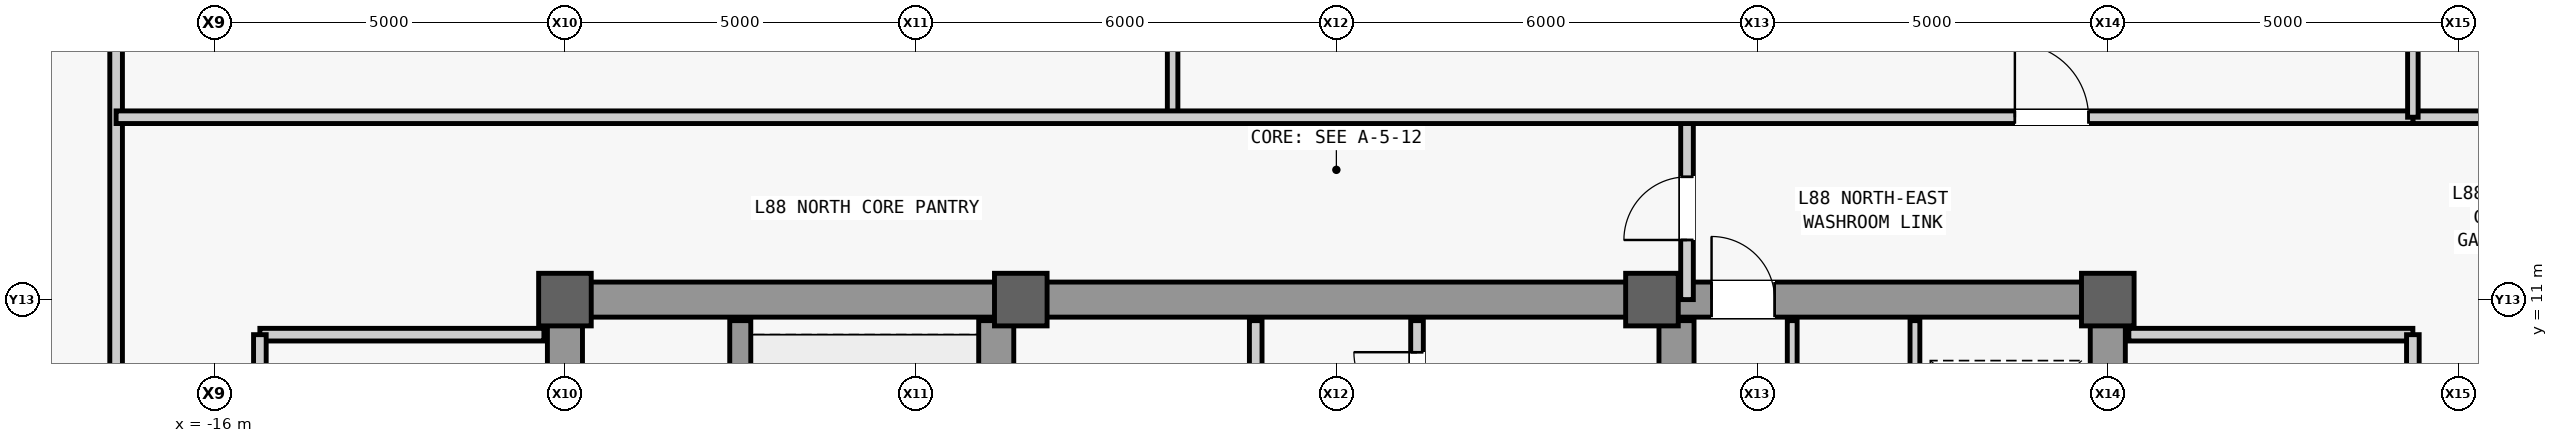
"""IFC4 building model, lengths in metres.
Left out: names, types, materials, properties, quantities, classifications, styles, units other than length and angle.
Written with IfcOpenShell. Run it as: python <this file> out.ifc"""

import sys

from ifc_helpers import new_model, si_unit, direction, frame, frame_2d, origin, origin_2d, place, context, subcontext, project, spatial, rectangle, extrude, source, transform, mapped, element, fill, save


model = new_model("IFC4")
c1 = context("Model", 3, precision=1e-05, world=origin(), true_north=direction((0.0, 1.0)))
c2 = subcontext(c1, "Body", "Model", "MODEL_VIEW")
j1 = project(units=[si_unit("LENGTHUNIT", "METRE"), si_unit("PLANEANGLEUNIT", "RADIAN")], contexts=[c1])
p1 = place(None, origin())
s1 = spatial("IfcSite", under=j1, at=p1, CompositionType="ELEMENT")
p2 = place(p1, origin())
s2 = spatial("IfcBuilding", under=s1, at=p2, CompositionType="ELEMENT")
p3 = place(p2, frame((0.0, 0.0, 370.3)))
s3 = spatial("IfcBuildingStorey", under=s2, at=p3, CompositionType="ELEMENT", Elevation=370.3)
m1 = source(origin(), c2, "Body", "SweptSolid", [
    extrude(rectangle(XDim=22.0, YDim=0.5, at=frame_2d((11.0, 0.0))), origin(), (0.0, 0.0, 1.0), 4.6),
])
p4 = place(p3, frame((-11.0, -11.0, 0.0), z_axis=(0.0, 0.0, 1.0), x_axis=(0.0, 1.0, 0.0)))
e1 = element("IfcWall", 1, at=p4, inside=s3, PredefinedType="SHEAR", context=c2, shape_type="MappedRepresentation", body=[
    mapped(m1, transform((0.0, 0.0, 0.0), scale=1.0)),
])
m2 = source(origin(), c2, "Body", "SweptSolid", [
    extrude(rectangle(XDim=1.1, YDim=2.2, at=frame_2d((0.55, 1.1))), frame((0.0, 0.26, 0.0), z_axis=(0.0, -1.0, 0.0), x_axis=(1.0, 0.0, 0.0)), (0.0, 0.0, 1.0), 0.52),
])
p5 = place(p4, frame((0.8, 0.0, 0.0)))
e2 = element("IfcOpeningElement", 2, at=p5, cuts=e1, PredefinedType="OPENING", context=c2, shape_type="MappedRepresentation", body=[
    mapped(m2, transform((0.0, 0.0, 0.0), scale=1.0)),
])
p6 = place(p4, frame((12.5, 0.0, 0.0)))
e3 = element("IfcOpeningElement", 3, at=p6, cuts=e1, PredefinedType="OPENING", context=c2, shape_type="MappedRepresentation", body=[
    mapped(m2, transform((0.0, 0.0, 0.0), scale=1.0)),
])
m3 = source(origin(), c2, "Body", "SweptSolid", [
    extrude(rectangle(XDim=0.9, YDim=2.15, at=frame_2d((0.45, 1.075))), frame((0.0, 0.26, 0.0), z_axis=(0.0, -1.0, 0.0), x_axis=(1.0, 0.0, 0.0)), (0.0, 0.0, 1.0), 0.52),
])
p7 = place(p4, frame((7.575, 0.0, 0.0)))
e4 = element("IfcOpeningElement", 4, at=p7, cuts=e1, PredefinedType="OPENING", context=c2, shape_type="MappedRepresentation", body=[
    mapped(m3, transform((0.0, 0.0, 0.0), scale=1.0)),
])
m4 = source(origin(), c2, "Body", "SweptSolid", [
    extrude(rectangle(XDim=1.2, YDim=2.3, at=frame_2d((0.6, 1.15))), frame((0.0, 0.26, 0.0), z_axis=(0.0, -1.0, 0.0), x_axis=(1.0, 0.0, 0.0)), (0.0, 0.0, 1.0), 0.52),
])
p8 = place(p4, frame((14.6, 0.0, 0.0)))
e5 = element("IfcOpeningElement", 5, at=p8, cuts=e1, PredefinedType="OPENING", context=c2, shape_type="MappedRepresentation", body=[
    mapped(m4, transform((0.0, 0.0, 0.0), scale=1.0)),
])
p9 = place(p4, frame((18.2, 0.0, 0.0)))
e6 = element("IfcOpeningElement", 6, at=p9, cuts=e1, PredefinedType="OPENING", context=c2, shape_type="MappedRepresentation", body=[
    mapped(m4, transform((0.0, 0.0, 0.0), scale=1.0)),
])
m5 = source(origin(), c2, "Body", "SweptSolid", [
    extrude(rectangle(XDim=1.3, YDim=2.3, at=frame_2d((0.65, 1.15))), frame((0.0, 0.26, 0.0), z_axis=(0.0, -1.0, 0.0), x_axis=(1.0, 0.0, 0.0)), (0.0, 0.0, 1.0), 0.52),
])
p10 = place(p4, frame((2.7, 0.0, 0.0)))
e7 = element("IfcOpeningElement", 7, at=p10, cuts=e1, PredefinedType="OPENING", context=c2, shape_type="MappedRepresentation", body=[
    mapped(m5, transform((0.0, 0.0, 0.0), scale=1.0)),
])
p11 = place(p3, frame((11.0, -11.0, 0.0), z_axis=(0.0, 0.0, 1.0), x_axis=(0.0, 1.0, 0.0)))
e8 = element("IfcWall", 8, at=p11, inside=s3, PredefinedType="SHEAR", context=c2, shape_type="MappedRepresentation", body=[
    mapped(m1, transform((0.0, 0.0, 0.0), scale=1.0)),
])
p12 = place(p11, frame((0.8, 0.0, 0.0)))
e9 = element("IfcOpeningElement", 9, at=p12, cuts=e8, PredefinedType="OPENING", context=c2, shape_type="MappedRepresentation", body=[
    mapped(m2, transform((0.0, 0.0, 0.0), scale=1.0)),
])
p13 = place(p11, frame((7.575, 0.0, 0.0)))
e10 = element("IfcOpeningElement", 10, at=p13, cuts=e8, PredefinedType="OPENING", context=c2, shape_type="MappedRepresentation", body=[
    mapped(m3, transform((0.0, 0.0, 0.0), scale=1.0)),
])
p14 = place(p11, frame((17.6, 0.0, 0.0)))
e11 = element("IfcOpeningElement", 11, at=p14, cuts=e8, PredefinedType="OPENING", context=c2, shape_type="MappedRepresentation", body=[
    mapped(m4, transform((0.0, 0.0, 0.0), scale=1.0)),
])
p15 = place(p11, frame((19.6, 0.0, 0.0)))
e12 = element("IfcOpeningElement", 12, at=p15, cuts=e8, PredefinedType="OPENING", context=c2, shape_type="MappedRepresentation", body=[
    mapped(m4, transform((0.0, 0.0, 0.0), scale=1.0)),
])
p16 = place(p11, frame((2.7, 0.0, 0.0)))
e13 = element("IfcOpeningElement", 13, at=p16, cuts=e8, PredefinedType="OPENING", context=c2, shape_type="MappedRepresentation", body=[
    mapped(m5, transform((0.0, 0.0, 0.0), scale=1.0)),
])
p17 = place(p11, frame((13.35, 0.0, 0.0)))
e14 = element("IfcOpeningElement", 14, at=p17, cuts=e8, PredefinedType="OPENING", context=c2, shape_type="MappedRepresentation", body=[
    mapped(m5, transform((0.0, 0.0, 0.0), scale=1.0)),
])
m6 = source(origin(), c2, "Body", "SweptSolid", [
    extrude(rectangle(XDim=21.4, YDim=0.5, at=frame_2d((10.7, 0.0))), origin(), (0.0, 0.0, 1.0), 4.6),
])
for number, where, z_axis, x_axis in (
    (15, (-4.85, -10.7, 0.0), (0.0, 0.0, 1.0), (0.0, 1.0, 0.0)),
    (16, (4.85, -10.7, 0.0), (0.0, 0.0, 1.0), (0.0, 1.0, 0.0)),
):
    element("IfcWall", number, at=place(p3, frame(where, z_axis=z_axis, x_axis=x_axis)), inside=s3, PredefinedType="SHEAR", context=c2, shape_type="MappedRepresentation", body=[
        mapped(m6, transform((0.0, 0.0, 0.0), scale=1.0)),
    ])
m7 = source(origin(), c2, "Body", "SweptSolid", [
    extrude(rectangle(XDim=5.9, YDim=0.5, at=frame_2d((2.95, 0.0))), origin(), (0.0, 0.0, 1.0), 4.6),
])
p18 = place(p3, frame((-10.75, 11.0, 0.0), z_axis=(0.0, 0.0, 1.0), x_axis=(1.0, 0.0, 0.0)))
e17 = element("IfcWall", 17, at=p18, inside=s3, PredefinedType="SHEAR", context=c2, shape_type="MappedRepresentation", body=[
    mapped(m7, transform((0.0, 0.0, 0.0), scale=1.0)),
])
p19 = place(p3, frame((4.85, 11.0, 0.0), z_axis=(0.0, 0.0, 1.0), x_axis=(1.0, 0.0, 0.0)))
e18 = element("IfcWall", 18, at=p19, inside=s3, PredefinedType="SHEAR", context=c2, shape_type="MappedRepresentation", body=[
    mapped(m7, transform((0.0, 0.0, 0.0), scale=1.0)),
])
p20 = place(p19, frame((0.5, 0.0, 0.0)))
e19 = element("IfcOpeningElement", 19, at=p20, cuts=e18, PredefinedType="OPENING", context=c2, shape_type="MappedRepresentation", body=[
    mapped(m3, transform((0.0, 0.0, 0.0), scale=1.0)),
])
m8 = source(origin(), c2, "Body", "SweptSolid", [
    extrude(rectangle(XDim=9.2, YDim=0.5, at=frame_2d((4.6, 0.0))), origin(), (0.0, 0.0, 1.0), 4.6),
])
p21 = place(p3, frame((-4.6, 11.0, 0.0), z_axis=(0.0, 0.0, 1.0), x_axis=(1.0, 0.0, 0.0)))
e20 = element("IfcWall", 20, at=p21, inside=s3, PredefinedType="SHEAR", context=c2, shape_type="MappedRepresentation", body=[
    mapped(m8, transform((0.0, 0.0, 0.0), scale=1.0)),
])
m9 = source(origin(), c2, "Body", "SweptSolid", [
    extrude(rectangle(XDim=0.75, YDim=0.75, at=origin_2d()), origin(), (0.0, 0.0, 1.0), 5.2),
])
for number, where, z_axis, x_axis in (
    (21, (-11.0, 11.0, 0.0), (0.0, 0.0, 1.0), (1.0, 0.0, 0.0)),
    (22, (-4.5, 11.0, 0.0), (0.0, 0.0, 1.0), (1.0, 0.0, 0.0)),
    (23, (4.5, 11.0, 0.0), (0.0, 0.0, 1.0), (1.0, 0.0, 0.0)),
    (24, (11.0, 11.0, 0.0), (0.0, 0.0, 1.0), (1.0, 0.0, 0.0)),
):
    element("IfcColumn", number, at=place(p3, frame(where, z_axis=z_axis, x_axis=x_axis)), inside=s3, PredefinedType="COLUMN", context=c2, shape_type="MappedRepresentation", body=[
        mapped(m9, transform((0.0, 0.0, 0.0), scale=1.0)),
    ])
m10 = source(origin(), c2, "Body", "SweptSolid", [
    extrude(rectangle(XDim=7.75, YDim=0.3, at=frame_2d((3.875, 0.0))), origin(), (0.0, 0.0, 1.0), 4.6),
])
p22 = place(p3, frame((-8.5, 2.95, 0.0), z_axis=(0.0, 0.0, 1.0), x_axis=(0.0, 1.0, 0.0)))
e25 = element("IfcWall", 25, at=p22, inside=s3, PredefinedType="SHEAR", context=c2, shape_type="MappedRepresentation", body=[
    mapped(m10, transform((0.0, 0.0, 0.0), scale=1.0)),
])
m11 = source(origin(), c2, "Body", "SweptSolid", [
    extrude(rectangle(XDim=9.4, YDim=0.14, at=frame_2d((4.7, 0.0))), origin(), (0.0, 0.0, 1.0), 4.6),
])
p23 = place(p3, frame((8.25, 1.3, 0.0), z_axis=(0.0, 0.0, 1.0), x_axis=(0.0, 1.0, 0.0)))
e26 = element("IfcWall", 26, at=p23, inside=s3, PredefinedType="PARTITIONING", context=c2, shape_type="MappedRepresentation", body=[
    mapped(m11, transform((0.0, 0.0, 0.0), scale=1.0)),
])
m12 = source(origin(), c2, "Body", "SweptSolid", [
    extrude(rectangle(XDim=5.7, YDim=0.14, at=frame_2d((2.85, 0.0))), origin(), (0.0, 0.0, 1.0), 4.6),
])
p24 = place(p3, frame((6.5, 5.0, 0.0), z_axis=(0.0, 0.0, 1.0), x_axis=(0.0, 1.0, 0.0)))
e27 = element("IfcWall", 27, at=p24, inside=s3, PredefinedType="PARTITIONING", context=c2, shape_type="MappedRepresentation", body=[
    mapped(m12, transform((0.0, 0.0, 0.0), scale=1.0)),
])
m13 = source(origin(), c2, "Body", "SweptSolid", [
    extrude(rectangle(XDim=0.9, YDim=2.15, at=frame_2d((0.45, 1.075))), frame((0.0, 0.08, 0.0), z_axis=(0.0, -1.0, 0.0), x_axis=(1.0, 0.0, 0.0)), (0.0, 0.0, 1.0), 0.16),
])
p25 = place(p24, frame((2.05, 0.0, 0.0)))
e28 = element("IfcOpeningElement", 28, at=p25, cuts=e27, PredefinedType="OPENING", context=c2, shape_type="MappedRepresentation", body=[
    mapped(m13, transform((0.0, 0.0, 0.0), scale=1.0)),
])
m14 = source(origin(), c2, "Body", "SweptSolid", [
    extrude(rectangle(XDim=4.05, YDim=0.18, at=frame_2d((2.025, 0.0))), origin(), (0.0, 0.0, 1.0), 4.6),
])
p26 = place(p3, frame((-15.35, 10.5, 0.0), z_axis=(0.0, 0.0, 1.0), x_axis=(1.0, 0.0, 0.0)))
e29 = element("IfcWall", 29, at=p26, inside=s3, PredefinedType="PARTITIONING", context=c2, shape_type="MappedRepresentation", body=[
    mapped(m14, transform((0.0, 0.0, 0.0), scale=1.0)),
])
m15 = source(origin(), c2, "Body", "SweptSolid", [
    extrude(rectangle(XDim=16.6, YDim=0.18, at=frame_2d((8.3, 0.0))), origin(), (0.0, 0.0, 1.0), 4.6),
])
p27 = place(p3, frame((-15.35, -6.1, 0.0), z_axis=(0.0, 0.0, 1.0), x_axis=(0.0, 1.0, 0.0)))
e30 = element("IfcWall", 30, at=p27, inside=s3, PredefinedType="PARTITIONING", context=c2, shape_type="MappedRepresentation", body=[
    mapped(m15, transform((0.0, 0.0, 0.0), scale=1.0)),
])
m16 = source(origin(), c2, "Body", "SweptSolid", [
    extrude(rectangle(XDim=1.8, YDim=2.25, at=frame_2d((0.9, 1.125))), frame((0.0, 0.1, 0.0), z_axis=(0.0, -1.0, 0.0), x_axis=(1.0, 0.0, 0.0)), (0.0, 0.0, 1.0), 0.2),
])
p28 = place(p27, frame((2.7, 0.0, 0.0)))
e31 = element("IfcOpeningElement", 31, at=p28, cuts=e30, PredefinedType="OPENING", context=c2, shape_type="MappedRepresentation", body=[
    mapped(m16, transform((0.0, 0.0, 0.0), scale=1.0)),
])
p29 = place(p27, frame((11.0, 0.0, 0.0)))
e32 = element("IfcOpeningElement", 32, at=p29, cuts=e30, PredefinedType="OPENING", context=c2, shape_type="MappedRepresentation", body=[
    mapped(m16, transform((0.0, 0.0, 0.0), scale=1.0)),
])
p30 = place(p3, frame((11.3, 10.5, 0.0), z_axis=(0.0, 0.0, 1.0), x_axis=(1.0, 0.0, 0.0)))
e33 = element("IfcWall", 33, at=p30, inside=s3, PredefinedType="PARTITIONING", context=c2, shape_type="MappedRepresentation", body=[
    mapped(m14, transform((0.0, 0.0, 0.0), scale=1.0)),
])
p31 = place(p3, frame((15.35, -6.1, 0.0), z_axis=(0.0, 0.0, 1.0), x_axis=(0.0, 1.0, 0.0)))
e34 = element("IfcWall", 34, at=p31, inside=s3, PredefinedType="PARTITIONING", context=c2, shape_type="MappedRepresentation", body=[
    mapped(m15, transform((0.0, 0.0, 0.0), scale=1.0)),
])
p32 = place(p31, frame((2.7, 0.0, 0.0)))
e35 = element("IfcOpeningElement", 35, at=p32, cuts=e34, PredefinedType="OPENING", context=c2, shape_type="MappedRepresentation", body=[
    mapped(m16, transform((0.0, 0.0, 0.0), scale=1.0)),
])
p33 = place(p31, frame((13.0, 0.0, 0.0)))
e36 = element("IfcOpeningElement", 36, at=p33, cuts=e34, PredefinedType="OPENING", context=c2, shape_type="MappedRepresentation", body=[
    mapped(m16, transform((0.0, 0.0, 0.0), scale=1.0)),
])
m17 = source(origin(), c2, "Body", "SweptSolid", [
    extrude(rectangle(XDim=5.4, YDim=0.18, at=frame_2d((2.7, 0.0))), origin(), (0.0, 0.0, 1.0), 4.6),
])
p34 = place(p3, frame((-1.15, 5.3, 0.0), z_axis=(0.0, 0.0, 1.0), x_axis=(0.0, 1.0, 0.0)))
e37 = element("IfcWall", 37, at=p34, inside=s3, PredefinedType="PARTITIONING", context=c2, shape_type="MappedRepresentation", body=[
    mapped(m17, transform((0.0, 0.0, 0.0), scale=1.0)),
])
m18 = source(origin(), c2, "Body", "SweptSolid", [
    extrude(rectangle(XDim=0.9, YDim=2.15, at=frame_2d((0.45, 1.075))), frame((0.0, 0.1, 0.0), z_axis=(0.0, -1.0, 0.0), x_axis=(1.0, 0.0, 0.0)), (0.0, 0.0, 1.0), 0.2),
])
p35 = place(p34, frame((0.7, 0.0, 0.0)))
e38 = element("IfcOpeningElement", 38, at=p35, cuts=e37, PredefinedType="OPENING", context=c2, shape_type="MappedRepresentation", body=[
    mapped(m18, transform((0.0, 0.0, 0.0), scale=1.0)),
])
p36 = place(p34, frame((3.4, 0.0, 0.0)))
e39 = element("IfcOpeningElement", 39, at=p36, cuts=e37, PredefinedType="OPENING", context=c2, shape_type="MappedRepresentation", body=[
    mapped(m18, transform((0.0, 0.0, 0.0), scale=1.0)),
])
p37 = place(p3, frame((1.15, 5.3, 0.0), z_axis=(0.0, 0.0, 1.0), x_axis=(0.0, 1.0, 0.0)))
e40 = element("IfcWall", 40, at=p37, inside=s3, PredefinedType="PARTITIONING", context=c2, shape_type="MappedRepresentation", body=[
    mapped(m17, transform((0.0, 0.0, 0.0), scale=1.0)),
])
p38 = place(p37, frame((0.45, 0.0, 0.0)))
e41 = element("IfcOpeningElement", 41, at=p38, cuts=e40, PredefinedType="OPENING", context=c2, shape_type="MappedRepresentation", body=[
    mapped(m18, transform((0.0, 0.0, 0.0), scale=1.0)),
])
p39 = place(p37, frame((2.25, 0.0, 0.0)))
e42 = element("IfcOpeningElement", 42, at=p39, cuts=e40, PredefinedType="OPENING", context=c2, shape_type="MappedRepresentation", body=[
    mapped(m18, transform((0.0, 0.0, 0.0), scale=1.0)),
])
p40 = place(p37, frame((4.05, 0.0, 0.0)))
e43 = element("IfcOpeningElement", 43, at=p40, cuts=e40, PredefinedType="OPENING", context=c2, shape_type="MappedRepresentation", body=[
    mapped(m18, transform((0.0, 0.0, 0.0), scale=1.0)),
])
m19 = source(origin(), c2, "Body", "SweptSolid", [
    extrude(rectangle(XDim=8.4, YDim=0.18, at=frame_2d((4.2, 0.0))), origin(), (0.0, 0.0, 1.0), 4.6),
])
p41 = place(p3, frame((-17.4, 7.2, 0.0), z_axis=(0.0, 0.0, 1.0), x_axis=(0.0, 1.0, 0.0)))
e44 = element("IfcWall", 44, at=p41, inside=s3, PredefinedType="PARTITIONING", context=c2, shape_type="MappedRepresentation", body=[
    mapped(m19, transform((0.0, 0.0, 0.0), scale=1.0)),
])
m20 = source(origin(), c2, "Body", "SweptSolid", [
    extrude(rectangle(XDim=2.6, YDim=0.18, at=frame_2d((1.3, 0.0))), origin(), (0.0, 0.0, 1.0), 4.6),
])
p42 = place(p3, frame((5.0, 11.0, 0.0), z_axis=(0.0, 0.0, 1.0), x_axis=(0.0, 1.0, 0.0)))
e45 = element("IfcWall", 45, at=p42, inside=s3, PredefinedType="PARTITIONING", context=c2, shape_type="MappedRepresentation", body=[
    mapped(m20, transform((0.0, 0.0, 0.0), scale=1.0)),
])
p43 = place(p42, frame((0.85, 0.0, 0.0)))
e46 = element("IfcOpeningElement", 46, at=p43, cuts=e45, PredefinedType="OPENING", context=c2, shape_type="MappedRepresentation", body=[
    mapped(m18, transform((0.0, 0.0, 0.0), scale=1.0)),
])
m21 = source(origin(), c2, "Body", "SweptSolid", [
    extrude(rectangle(XDim=2.4, YDim=0.18, at=frame_2d((1.2, 0.0))), origin(), (0.0, 0.0, 1.0), 4.6),
])
p44 = place(p3, frame((15.35, 13.6, 0.0), z_axis=(0.0, 0.0, 1.0), x_axis=(1.0, 0.0, 0.0)))
e47 = element("IfcWall", 47, at=p44, inside=s3, PredefinedType="PARTITIONING", context=c2, shape_type="MappedRepresentation", body=[
    mapped(m21, transform((0.0, 0.0, 0.0), scale=1.0)),
])
m22 = source(origin(), c2, "Body", "SweptSolid", [
    extrude(rectangle(XDim=12.4, YDim=0.15, at=frame_2d((6.2, 0.0))), origin(), (0.0, 0.0, 1.0), 4.6),
])
p45 = place(p3, frame((-2.335, 13.6, 0.0), z_axis=(0.0, 0.0, 1.0), x_axis=(0.0, 1.0, 0.0)))
e48 = element("IfcWall", 48, at=p45, inside=s3, PredefinedType="PARTITIONING", context=c2, shape_type="MappedRepresentation", body=[
    mapped(m22, transform((0.0, 0.0, 0.0), scale=1.0)),
])
m23 = source(origin(), c2, "Body", "SweptSolid", [
    extrude(rectangle(XDim=0.95, YDim=2.15, at=frame_2d((0.475, 1.075))), frame((0.0, 0.085, 0.0), z_axis=(0.0, -1.0, 0.0), x_axis=(1.0, 0.0, 0.0)), (0.0, 0.0, 1.0), 0.17),
])
p46 = place(p45, frame((2.501, 0.0, 0.0)))
e49 = element("IfcOpeningElement", 49, at=p46, cuts=e48, PredefinedType="OPENING", context=c2, shape_type="MappedRepresentation", body=[
    mapped(m23, transform((0.0, 0.0, 0.0), scale=1.0)),
])
m24 = source(origin(), c2, "Body", "SweptSolid", [
    extrude(rectangle(XDim=32.75, YDim=0.18, at=frame_2d((16.375, 0.0))), origin(), (0.0, 0.0, 1.0), 4.6),
])
p47 = place(p3, frame((-17.4, 13.6, 0.0), z_axis=(0.0, 0.0, 1.0), x_axis=(1.0, 0.0, 0.0)))
e50 = element("IfcWall", 50, at=p47, inside=s3, PredefinedType="PARTITIONING", context=c2, shape_type="MappedRepresentation", body=[
    mapped(m24, transform((0.0, 0.0, 0.0), scale=1.0)),
])
m25 = source(origin(), c2, "Body", "SweptSolid", [
    extrude(rectangle(XDim=1.05, YDim=2.2, at=frame_2d((0.525, 1.1))), frame((0.0, 0.1, 0.0), z_axis=(0.0, -1.0, 0.0), x_axis=(1.0, 0.0, 0.0)), (0.0, 0.0, 1.0), 0.2),
])
p48 = place(p47, frame((27.075, 0.0, 0.0)))
e51 = element("IfcOpeningElement", 51, at=p48, cuts=e50, PredefinedType="OPENING", context=c2, shape_type="MappedRepresentation", body=[
    mapped(m25, transform((0.0, 0.0, 0.0), scale=1.0)),
])
p49 = place(p3, frame((15.35, 13.6, 0.0), z_axis=(0.0, 0.0, 1.0), x_axis=(0.0, 1.0, 0.0)))
e52 = element("IfcWall", 52, at=p49, inside=s3, PredefinedType="PARTITIONING", context=c2, shape_type="MappedRepresentation", body=[
    mapped(m22, transform((0.0, 0.0, 0.0), scale=1.0)),
])
m26 = source(origin(), c2, "Body", "SweptSolid", [
    extrude(rectangle(XDim=0.9, YDim=2.15, at=frame_2d((0.45, 1.075))), frame((0.0, 0.025, 0.0), z_axis=(0.0, -1.0, 0.0), x_axis=(1.0, 0.0, 0.0)), (0.0, 0.0, 1.0), 0.05),
])
p50 = place(p20, origin())
e53 = element("IfcDoor", 53, at=p50, inside=s3, OperationType="SINGLE_SWING_LEFT", PredefinedType="DOOR", context=c2, shape_type="MappedRepresentation", body=[
    mapped(m26, transform((0.0, 0.0, 0.0), scale=1.0)),
])
fill(e19, e53)
p51 = place(p40, origin())
e54 = element("IfcDoor", 54, at=p51, inside=s3, OperationType="SINGLE_SWING_RIGHT", PredefinedType="DOOR", context=c2, shape_type="MappedRepresentation", body=[
    mapped(m26, transform((0.0, 0.0, 0.0), scale=1.0)),
])
fill(e43, e54)
p52 = place(p43, origin())
e55 = element("IfcDoor", 55, at=p52, inside=s3, OperationType="SINGLE_SWING_LEFT", PredefinedType="DOOR", context=c2, shape_type="MappedRepresentation", body=[
    mapped(m26, transform((0.0, 0.0, 0.0), scale=1.0)),
])
fill(e46, e55)
m27 = source(origin(), c2, "Body", "SweptSolid", [
    extrude(rectangle(XDim=1.05, YDim=2.2, at=frame_2d((0.525, 1.1))), frame((0.0, 0.025, 0.0), z_axis=(0.0, -1.0, 0.0), x_axis=(1.0, 0.0, 0.0)), (0.0, 0.0, 1.0), 0.05),
])
p53 = place(p48, origin())
e56 = element("IfcDoor", 56, at=p53, inside=s3, OperationType="SINGLE_SWING_LEFT", PredefinedType="DOOR", context=c2, shape_type="MappedRepresentation", body=[
    mapped(m27, transform((0.0, 0.0, 0.0), scale=1.0)),
])
fill(e51, e56)
save(model, sys.argv[1])
